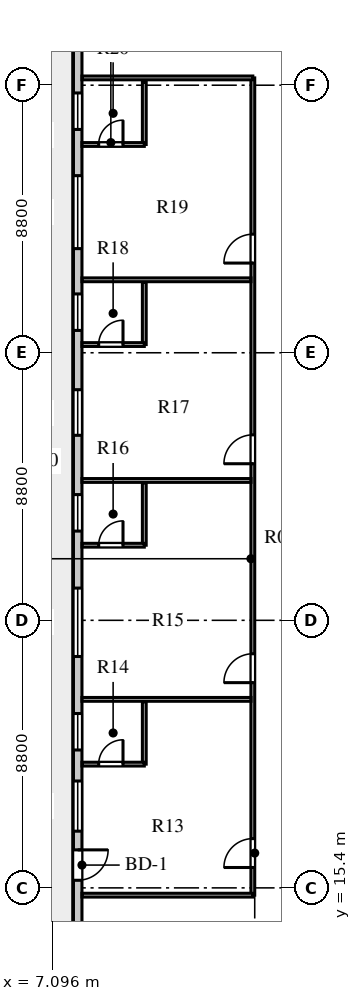
"""IFC4 building model, lengths in metres.
Left out: names, types, materials, properties, quantities, classifications, styles, units other than length and angle.
Written with IfcOpenShell. Run it as: python <this file> out.ifc"""

import sys

from ifc_helpers import new_model, si_unit, direction, frame, frame_2d, origin, place, context, subcontext, project, spatial, rectangle, extrude, element, fill, save


model = new_model("IFC4")
c1 = context("Model", 3, precision=1e-05, world=origin(), true_north=direction((0.0, 1.0)))
c2 = subcontext(c1, "Body", "Model", "MODEL_VIEW")
j1 = project(units=[si_unit("LENGTHUNIT", "METRE"), si_unit("PLANEANGLEUNIT", "RADIAN")], contexts=[c1])
p1 = place(None, origin())
s1 = spatial("IfcSite", under=j1, at=p1, CompositionType="ELEMENT")
p2 = place(p1, origin())
s2 = spatial("IfcBuilding", under=s1, at=p2, CompositionType="ELEMENT")
p3 = place(p2, frame((0.0, 0.0, 165.6)))
s3 = spatial("IfcBuildingStorey", under=s2, at=p3, CompositionType="ELEMENT", Elevation=165.6)
p4 = place(p3, frame((7.94, 44.07, 0.0), z_axis=(0.0, 0.0, 1.0), x_axis=(0.0, -1.0, 0.0)))
e1 = element("IfcWall", 1, at=p4, inside=s3, PredefinedType="STANDARD", context=c2, shape_type="SweptSolid", body=[
    extrude(rectangle(XDim=30.94, YDim=0.28, at=frame_2d((15.47, 0.0))), origin(), (0.0, 0.0, 1.0), 3.6),
])
p5 = place(p4, frame((27.42, 0.0, 0.0)))
e2 = element("IfcOpeningElement", 2, at=p5, cuts=e1, PredefinedType="OPENING", context=c2, shape_type="SweptSolid", body=[
    extrude(rectangle(XDim=1.0, YDim=2.05, at=frame_2d((0.5, 1.025))), frame((0.0, 0.15, 0.0), z_axis=(0.0, -1.0, 0.0), x_axis=(1.0, 0.0, 0.0)), (0.0, 0.0, 1.0), 0.3),
])
p6 = place(p4, frame((25.155, 0.0, 0.8)))
e3 = element("IfcOpeningElement", 3, at=p6, cuts=e1, PredefinedType="OPENING", context=c2, shape_type="SweptSolid", body=[
    extrude(rectangle(XDim=1.65, YDim=1.95, at=frame_2d((0.825, 0.975))), frame((0.0, 0.15, 0.0), z_axis=(0.0, -1.0, 0.0), x_axis=(1.0, 0.0, 0.0)), (0.0, 0.0, 1.0), 0.3),
])
p7 = place(p4, frame((22.935, 0.0, 0.8)))
e4 = element("IfcOpeningElement", 4, at=p7, cuts=e1, PredefinedType="OPENING", context=c2, shape_type="SweptSolid", body=[
    extrude(rectangle(XDim=1.2, YDim=1.75, at=frame_2d((0.6, 0.875))), frame((0.0, 0.15, 0.0), z_axis=(0.0, -1.0, 0.0), x_axis=(1.0, 0.0, 0.0)), (0.0, 0.0, 1.0), 0.3),
])
p8 = place(p4, frame((18.81, 0.0, 0.8)))
e5 = element("IfcOpeningElement", 5, at=p8, cuts=e1, PredefinedType="OPENING", context=c2, shape_type="SweptSolid", body=[
    extrude(rectangle(XDim=2.25, YDim=2.0, at=frame_2d((1.125, 1.0))), frame((0.0, 0.15, 0.0), z_axis=(0.0, -1.0, 0.0), x_axis=(1.0, 0.0, 0.0)), (0.0, 0.0, 1.0), 0.3),
])
p9 = place(p4, frame((15.735, 0.0, 0.8)))
e6 = element("IfcOpeningElement", 6, at=p9, cuts=e1, PredefinedType="OPENING", context=c2, shape_type="SweptSolid", body=[
    extrude(rectangle(XDim=1.2, YDim=1.75, at=frame_2d((0.6, 0.875))), frame((0.0, 0.15, 0.0), z_axis=(0.0, -1.0, 0.0), x_axis=(1.0, 0.0, 0.0)), (0.0, 0.0, 1.0), 0.3),
])
p10 = place(p4, frame((12.285, 0.0, 0.8)))
e7 = element("IfcOpeningElement", 7, at=p10, cuts=e1, PredefinedType="OPENING", context=c2, shape_type="SweptSolid", body=[
    extrude(rectangle(XDim=1.5, YDim=2.0, at=frame_2d((0.75, 1.0))), frame((0.0, 0.15, 0.0), z_axis=(0.0, -1.0, 0.0), x_axis=(1.0, 0.0, 0.0)), (0.0, 0.0, 1.0), 0.3),
])
p11 = place(p4, frame((9.135, 0.0, 0.8)))
e8 = element("IfcOpeningElement", 8, at=p11, cuts=e1, PredefinedType="OPENING", context=c2, shape_type="SweptSolid", body=[
    extrude(rectangle(XDim=1.2, YDim=1.75, at=frame_2d((0.6, 0.875))), frame((0.0, 0.15, 0.0), z_axis=(0.0, -1.0, 0.0), x_axis=(1.0, 0.0, 0.0)), (0.0, 0.0, 1.0), 0.3),
])
p12 = place(p4, frame((5.245, 0.0, 0.8)))
e9 = element("IfcOpeningElement", 9, at=p12, cuts=e1, PredefinedType="OPENING", context=c2, shape_type="SweptSolid", body=[
    extrude(rectangle(XDim=2.4, YDim=2.05, at=frame_2d((1.2, 1.025))), frame((0.0, 0.15, 0.0), z_axis=(0.0, -1.0, 0.0), x_axis=(1.0, 0.0, 0.0)), (0.0, 0.0, 1.0), 0.3),
])
p13 = place(p4, frame((2.525, 0.0, 0.8)))
e10 = element("IfcOpeningElement", 10, at=p13, cuts=e1, PredefinedType="OPENING", context=c2, shape_type="SweptSolid", body=[
    extrude(rectangle(XDim=1.2, YDim=1.75, at=frame_2d((0.6, 0.875))), frame((0.0, 0.15, 0.0), z_axis=(0.0, -1.0, 0.0), x_axis=(1.0, 0.0, 0.0)), (0.0, 0.0, 1.0), 0.3),
])
p14 = place(p3, frame((13.7, 15.16, 0.0), z_axis=(0.0, 0.0, 1.0), x_axis=(0.0, 1.0, 0.0)))
e11 = element("IfcWall", 11, at=p14, inside=s3, PredefinedType="PLUMBINGWALL", context=c2, shape_type="SweptSolid", body=[
    extrude(rectangle(XDim=26.88, YDim=0.125, at=frame_2d((13.44, 0.0))), origin(), (0.0, 0.0, 1.0), 3.6),
])
p15 = place(p14, frame((0.91, 0.0, 0.0)))
e12 = element("IfcOpeningElement", 12, at=p15, cuts=e11, PredefinedType="OPENING", context=c2, shape_type="SweptSolid", body=[
    extrude(rectangle(XDim=0.95, YDim=2.1, at=frame_2d((0.475, 1.05))), frame((0.0, 0.073, 0.0), z_axis=(0.0, -1.0, 0.0), x_axis=(1.0, 0.0, 0.0)), (0.0, 0.0, 1.0), 0.145),
])
p16 = place(p14, frame((6.99, 0.0, 0.0)))
e13 = element("IfcOpeningElement", 13, at=p16, cuts=e11, PredefinedType="OPENING", context=c2, shape_type="SweptSolid", body=[
    extrude(rectangle(XDim=0.95, YDim=2.1, at=frame_2d((0.475, 1.05))), frame((0.0, 0.073, 0.0), z_axis=(0.0, -1.0, 0.0), x_axis=(1.0, 0.0, 0.0)), (0.0, 0.0, 1.0), 0.145),
])
p17 = place(p14, frame((14.19, 0.0, 0.0)))
e14 = element("IfcOpeningElement", 14, at=p17, cuts=e11, PredefinedType="OPENING", context=c2, shape_type="SweptSolid", body=[
    extrude(rectangle(XDim=0.95, YDim=2.1, at=frame_2d((0.475, 1.05))), frame((0.0, 0.073, 0.0), z_axis=(0.0, -1.0, 0.0), x_axis=(1.0, 0.0, 0.0)), (0.0, 0.0, 1.0), 0.145),
])
p18 = place(p14, frame((20.79, 0.0, 0.0)))
e15 = element("IfcOpeningElement", 15, at=p18, cuts=e11, PredefinedType="OPENING", context=c2, shape_type="SweptSolid", body=[
    extrude(rectangle(XDim=0.95, YDim=2.1, at=frame_2d((0.475, 1.05))), frame((0.0, 0.073, 0.0), z_axis=(0.0, -1.0, 0.0), x_axis=(1.0, 0.0, 0.0)), (0.0, 0.0, 1.0), 0.145),
])
for number, where, z_axis, x_axis in (
    (16, (8.08, 15.16, 0.0), (0.0, 0.0, 1.0), (1.0, 0.0, 0.0)),
    (17, (8.08, 42.04, 0.0), (0.0, 0.0, 1.0), (1.0, 0.0, 0.0)),
):
    element("IfcWall", number, at=place(p3, frame(where, z_axis=z_axis, x_axis=x_axis)), inside=s3, PredefinedType="PLUMBINGWALL", context=c2, shape_type="SweptSolid", body=[
        extrude(rectangle(XDim=5.62, YDim=0.125, at=frame_2d((2.81, 0.0))), origin(), (0.0, 0.0, 1.0), 3.15),
    ])
p19 = place(p3, frame((10.13, 19.47, 0.0), z_axis=(0.0, 0.0, 1.0), x_axis=(0.0, 1.0, 0.0)))
e18 = element("IfcWall", 18, at=p19, inside=s3, PredefinedType="PLUMBINGWALL", context=c2, shape_type="SweptSolid", body=[
    extrude(rectangle(XDim=2.05, YDim=0.125, at=frame_2d((1.025, 0.0))), origin(), (0.0, 0.0, 1.0), 3.6),
])
p20 = place(p3, frame((8.08, 19.47, 0.0), z_axis=(0.0, 0.0, 1.0), x_axis=(1.0, 0.0, 0.0)))
e19 = element("IfcWall", 19, at=p20, inside=s3, PredefinedType="PLUMBINGWALL", context=c2, shape_type="SweptSolid", body=[
    extrude(rectangle(XDim=2.05, YDim=0.125, at=frame_2d((1.025, 0.0))), origin(), (0.0, 0.0, 1.0), 3.6),
])
p21 = place(p20, frame((0.55, 0.0, 0.0)))
e20 = element("IfcOpeningElement", 20, at=p21, cuts=e19, PredefinedType="OPENING", context=c2, shape_type="SweptSolid", body=[
    extrude(rectangle(XDim=0.8, YDim=2.05, at=frame_2d((0.4, 1.025))), frame((0.0, 0.073, 0.0), z_axis=(0.0, -1.0, 0.0), x_axis=(1.0, 0.0, 0.0)), (0.0, 0.0, 1.0), 0.145),
])
p22 = place(p3, frame((8.08, 21.6, 0.0), z_axis=(0.0, 0.0, 1.0), x_axis=(1.0, 0.0, 0.0)))
e21 = element("IfcWall", 21, at=p22, inside=s3, PredefinedType="PLUMBINGWALL", context=c2, shape_type="SweptSolid", body=[
    extrude(rectangle(XDim=5.56, YDim=0.125, at=frame_2d((2.78, 0.0))), origin(), (0.0, 0.0, 1.0), 3.6),
])
p23 = place(p3, frame((10.13, 26.67, 0.0), z_axis=(0.0, 0.0, 1.0), x_axis=(0.0, 1.0, 0.0)))
e22 = element("IfcWall", 22, at=p23, inside=s3, PredefinedType="PLUMBINGWALL", context=c2, shape_type="SweptSolid", body=[
    extrude(rectangle(XDim=2.05, YDim=0.125, at=frame_2d((1.025, 0.0))), origin(), (0.0, 0.0, 1.0), 3.6),
])
p24 = place(p3, frame((8.08, 26.67, 0.0), z_axis=(0.0, 0.0, 1.0), x_axis=(1.0, 0.0, 0.0)))
e23 = element("IfcWall", 23, at=p24, inside=s3, PredefinedType="PLUMBINGWALL", context=c2, shape_type="SweptSolid", body=[
    extrude(rectangle(XDim=2.05, YDim=0.125, at=frame_2d((1.025, 0.0))), origin(), (0.0, 0.0, 1.0), 3.6),
])
p25 = place(p24, frame((0.55, 0.0, 0.0)))
e24 = element("IfcOpeningElement", 24, at=p25, cuts=e23, PredefinedType="OPENING", context=c2, shape_type="SweptSolid", body=[
    extrude(rectangle(XDim=0.8, YDim=2.05, at=frame_2d((0.4, 1.025))), frame((0.0, 0.073, 0.0), z_axis=(0.0, -1.0, 0.0), x_axis=(1.0, 0.0, 0.0)), (0.0, 0.0, 1.0), 0.145),
])
p26 = place(p3, frame((8.08, 28.8, 0.0), z_axis=(0.0, 0.0, 1.0), x_axis=(1.0, 0.0, 0.0)))
e25 = element("IfcWall", 25, at=p26, inside=s3, PredefinedType="PLUMBINGWALL", context=c2, shape_type="SweptSolid", body=[
    extrude(rectangle(XDim=5.56, YDim=0.125, at=frame_2d((2.78, 0.0))), origin(), (0.0, 0.0, 1.0), 3.6),
])
p27 = place(p3, frame((10.13, 33.27, 0.0), z_axis=(0.0, 0.0, 1.0), x_axis=(0.0, 1.0, 0.0)))
e26 = element("IfcWall", 26, at=p27, inside=s3, PredefinedType="PLUMBINGWALL", context=c2, shape_type="SweptSolid", body=[
    extrude(rectangle(XDim=2.05, YDim=0.125, at=frame_2d((1.025, 0.0))), origin(), (0.0, 0.0, 1.0), 3.6),
])
p28 = place(p3, frame((8.08, 33.27, 0.0), z_axis=(0.0, 0.0, 1.0), x_axis=(1.0, 0.0, 0.0)))
e27 = element("IfcWall", 27, at=p28, inside=s3, PredefinedType="PLUMBINGWALL", context=c2, shape_type="SweptSolid", body=[
    extrude(rectangle(XDim=2.05, YDim=0.125, at=frame_2d((1.025, 0.0))), origin(), (0.0, 0.0, 1.0), 3.15),
])
p29 = place(p28, frame((0.55, 0.0, 0.0)))
e28 = element("IfcOpeningElement", 28, at=p29, cuts=e27, PredefinedType="OPENING", context=c2, shape_type="SweptSolid", body=[
    extrude(rectangle(XDim=0.8, YDim=2.05, at=frame_2d((0.4, 1.025))), frame((0.0, 0.073, 0.0), z_axis=(0.0, -1.0, 0.0), x_axis=(1.0, 0.0, 0.0)), (0.0, 0.0, 1.0), 0.145),
])
p30 = place(p3, frame((8.08, 35.4, 0.0), z_axis=(0.0, 0.0, 1.0), x_axis=(1.0, 0.0, 0.0)))
e29 = element("IfcWall", 29, at=p30, inside=s3, PredefinedType="PLUMBINGWALL", context=c2, shape_type="SweptSolid", body=[
    extrude(rectangle(XDim=5.56, YDim=0.125, at=frame_2d((2.78, 0.0))), origin(), (0.0, 0.0, 1.0), 3.6),
])
p31 = place(p3, frame((10.13, 39.85, 0.0), z_axis=(0.0, 0.0, 1.0), x_axis=(0.0, 1.0, 0.0)))
e30 = element("IfcWall", 30, at=p31, inside=s3, PredefinedType="PLUMBINGWALL", context=c2, shape_type="SweptSolid", body=[
    extrude(rectangle(XDim=2.05, YDim=0.125, at=frame_2d((1.025, 0.0))), origin(), (0.0, 0.0, 1.0), 3.6),
])
p32 = place(p3, frame((8.08, 39.85, 0.0), z_axis=(0.0, 0.0, 1.0), x_axis=(1.0, 0.0, 0.0)))
e31 = element("IfcWall", 31, at=p32, inside=s3, PredefinedType="PLUMBINGWALL", context=c2, shape_type="SweptSolid", body=[
    extrude(rectangle(XDim=2.05, YDim=0.125, at=frame_2d((1.025, 0.0))), origin(), (0.0, 0.0, 1.0), 3.6),
])
p33 = place(p32, frame((0.55, 0.0, 0.0)))
e32 = element("IfcOpeningElement", 32, at=p33, cuts=e31, PredefinedType="OPENING", context=c2, shape_type="SweptSolid", body=[
    extrude(rectangle(XDim=0.8, YDim=2.05, at=frame_2d((0.4, 1.025))), frame((0.0, 0.073, 0.0), z_axis=(0.0, -1.0, 0.0), x_axis=(1.0, 0.0, 0.0)), (0.0, 0.0, 1.0), 0.145),
])
p34 = place(p5, frame((1.0, 0.0, 0.0), z_axis=(0.0, 0.0, 1.0), x_axis=(-1.0, 0.0, 0.0)))
e33 = element("IfcDoor", 33, at=p34, inside=s3, OperationType="SINGLE_SWING_RIGHT", PredefinedType="DOOR", context=c2, shape_type="SweptSolid", body=[
    extrude(rectangle(XDim=1.0, YDim=2.05, at=frame_2d((0.5, 1.025))), frame((0.0, 0.025, 0.0), z_axis=(0.0, -1.0, 0.0), x_axis=(1.0, 0.0, 0.0)), (0.0, 0.0, 1.0), 0.05),
])
fill(e2, e33)
p35 = place(p6, origin())
e34 = element("IfcWindow", 34, at=p35, inside=s3, PartitioningType="SINGLE_PANEL", PredefinedType="WINDOW", context=c2, shape_type="SweptSolid", body=[
    extrude(rectangle(XDim=1.65, YDim=1.95, at=frame_2d((0.825, 0.975))), frame((0.0, 0.03, 0.0), z_axis=(0.0, -1.0, 0.0), x_axis=(1.0, 0.0, 0.0)), (0.0, 0.0, 1.0), 0.06),
])
fill(e3, e34)
p36 = place(p7, origin())
e35 = element("IfcWindow", 35, at=p36, inside=s3, PartitioningType="SINGLE_PANEL", PredefinedType="WINDOW", context=c2, shape_type="SweptSolid", body=[
    extrude(rectangle(XDim=1.2, YDim=1.75, at=frame_2d((0.6, 0.875))), frame((0.0, 0.03, 0.0), z_axis=(0.0, -1.0, 0.0), x_axis=(1.0, 0.0, 0.0)), (0.0, 0.0, 1.0), 0.06),
])
fill(e4, e35)
p37 = place(p8, origin())
e36 = element("IfcWindow", 36, at=p37, inside=s3, PartitioningType="SINGLE_PANEL", PredefinedType="WINDOW", context=c2, shape_type="SweptSolid", body=[
    extrude(rectangle(XDim=2.25, YDim=2.0, at=frame_2d((1.125, 1.0))), frame((0.0, 0.03, 0.0), z_axis=(0.0, -1.0, 0.0), x_axis=(1.0, 0.0, 0.0)), (0.0, 0.0, 1.0), 0.06),
])
fill(e5, e36)
p38 = place(p9, origin())
e37 = element("IfcWindow", 37, at=p38, inside=s3, PartitioningType="SINGLE_PANEL", PredefinedType="WINDOW", context=c2, shape_type="SweptSolid", body=[
    extrude(rectangle(XDim=1.2, YDim=1.75, at=frame_2d((0.6, 0.875))), frame((0.0, 0.03, 0.0), z_axis=(0.0, -1.0, 0.0), x_axis=(1.0, 0.0, 0.0)), (0.0, 0.0, 1.0), 0.06),
])
fill(e6, e37)
p39 = place(p10, origin())
e38 = element("IfcWindow", 38, at=p39, inside=s3, PartitioningType="SINGLE_PANEL", PredefinedType="WINDOW", context=c2, shape_type="SweptSolid", body=[
    extrude(rectangle(XDim=1.5, YDim=2.0, at=frame_2d((0.75, 1.0))), frame((0.0, 0.03, 0.0), z_axis=(0.0, -1.0, 0.0), x_axis=(1.0, 0.0, 0.0)), (0.0, 0.0, 1.0), 0.06),
])
fill(e7, e38)
p40 = place(p11, origin())
e39 = element("IfcWindow", 39, at=p40, inside=s3, PartitioningType="SINGLE_PANEL", PredefinedType="WINDOW", context=c2, shape_type="SweptSolid", body=[
    extrude(rectangle(XDim=1.2, YDim=1.75, at=frame_2d((0.6, 0.875))), frame((0.0, 0.03, 0.0), z_axis=(0.0, -1.0, 0.0), x_axis=(1.0, 0.0, 0.0)), (0.0, 0.0, 1.0), 0.06),
])
fill(e8, e39)
p41 = place(p12, origin())
e40 = element("IfcWindow", 40, at=p41, inside=s3, PartitioningType="SINGLE_PANEL", PredefinedType="WINDOW", context=c2, shape_type="SweptSolid", body=[
    extrude(rectangle(XDim=2.4, YDim=2.05, at=frame_2d((1.2, 1.025))), frame((0.0, 0.03, 0.0), z_axis=(0.0, -1.0, 0.0), x_axis=(1.0, 0.0, 0.0)), (0.0, 0.0, 1.0), 0.06),
])
fill(e9, e40)
p42 = place(p13, origin())
e41 = element("IfcWindow", 41, at=p42, inside=s3, PartitioningType="SINGLE_PANEL", PredefinedType="WINDOW", context=c2, shape_type="SweptSolid", body=[
    extrude(rectangle(XDim=1.2, YDim=1.75, at=frame_2d((0.6, 0.875))), frame((0.0, 0.03, 0.0), z_axis=(0.0, -1.0, 0.0), x_axis=(1.0, 0.0, 0.0)), (0.0, 0.0, 1.0), 0.06),
])
fill(e10, e41)
p43 = place(p15, origin())
e42 = element("IfcDoor", 42, at=p43, inside=s3, OperationType="SINGLE_SWING_LEFT", PredefinedType="DOOR", context=c2, shape_type="SweptSolid", body=[
    extrude(rectangle(XDim=0.95, YDim=2.1, at=frame_2d((0.475, 1.05))), frame((0.0, 0.025, 0.0), z_axis=(0.0, -1.0, 0.0), x_axis=(1.0, 0.0, 0.0)), (0.0, 0.0, 1.0), 0.05),
])
fill(e12, e42)
p44 = place(p21, frame((0.8, 0.0, 0.0), z_axis=(0.0, 0.0, 1.0), x_axis=(-1.0, 0.0, 0.0)))
e43 = element("IfcDoor", 43, at=p44, inside=s3, OperationType="SINGLE_SWING_LEFT", PredefinedType="DOOR", context=c2, shape_type="SweptSolid", body=[
    extrude(rectangle(XDim=0.8, YDim=2.05, at=frame_2d((0.4, 1.025))), frame((0.0, 0.025, 0.0), z_axis=(0.0, -1.0, 0.0), x_axis=(1.0, 0.0, 0.0)), (0.0, 0.0, 1.0), 0.05),
])
fill(e20, e43)
p45 = place(p16, origin())
e44 = element("IfcDoor", 44, at=p45, inside=s3, OperationType="SINGLE_SWING_LEFT", PredefinedType="DOOR", context=c2, shape_type="SweptSolid", body=[
    extrude(rectangle(XDim=0.95, YDim=2.1, at=frame_2d((0.475, 1.05))), frame((0.0, 0.025, 0.0), z_axis=(0.0, -1.0, 0.0), x_axis=(1.0, 0.0, 0.0)), (0.0, 0.0, 1.0), 0.05),
])
fill(e13, e44)
p46 = place(p25, frame((0.8, 0.0, 0.0), z_axis=(0.0, 0.0, 1.0), x_axis=(-1.0, 0.0, 0.0)))
e45 = element("IfcDoor", 45, at=p46, inside=s3, OperationType="SINGLE_SWING_LEFT", PredefinedType="DOOR", context=c2, shape_type="SweptSolid", body=[
    extrude(rectangle(XDim=0.8, YDim=2.05, at=frame_2d((0.4, 1.025))), frame((0.0, 0.025, 0.0), z_axis=(0.0, -1.0, 0.0), x_axis=(1.0, 0.0, 0.0)), (0.0, 0.0, 1.0), 0.05),
])
fill(e24, e45)
p47 = place(p17, origin())
e46 = element("IfcDoor", 46, at=p47, inside=s3, OperationType="SINGLE_SWING_LEFT", PredefinedType="DOOR", context=c2, shape_type="SweptSolid", body=[
    extrude(rectangle(XDim=0.95, YDim=2.1, at=frame_2d((0.475, 1.05))), frame((0.0, 0.025, 0.0), z_axis=(0.0, -1.0, 0.0), x_axis=(1.0, 0.0, 0.0)), (0.0, 0.0, 1.0), 0.05),
])
fill(e14, e46)
p48 = place(p29, frame((0.8, 0.0, 0.0), z_axis=(0.0, 0.0, 1.0), x_axis=(-1.0, 0.0, 0.0)))
e47 = element("IfcDoor", 47, at=p48, inside=s3, OperationType="SINGLE_SWING_LEFT", PredefinedType="DOOR", context=c2, shape_type="SweptSolid", body=[
    extrude(rectangle(XDim=0.8, YDim=2.05, at=frame_2d((0.4, 1.025))), frame((0.0, 0.025, 0.0), z_axis=(0.0, -1.0, 0.0), x_axis=(1.0, 0.0, 0.0)), (0.0, 0.0, 1.0), 0.05),
])
fill(e28, e47)
p49 = place(p18, origin())
e48 = element("IfcDoor", 48, at=p49, inside=s3, OperationType="SINGLE_SWING_LEFT", PredefinedType="DOOR", context=c2, shape_type="SweptSolid", body=[
    extrude(rectangle(XDim=0.95, YDim=2.1, at=frame_2d((0.475, 1.05))), frame((0.0, 0.025, 0.0), z_axis=(0.0, -1.0, 0.0), x_axis=(1.0, 0.0, 0.0)), (0.0, 0.0, 1.0), 0.05),
])
fill(e15, e48)
p50 = place(p33, frame((0.8, 0.0, 0.0), z_axis=(0.0, 0.0, 1.0), x_axis=(-1.0, 0.0, 0.0)))
e49 = element("IfcDoor", 49, at=p50, inside=s3, OperationType="SINGLE_SWING_LEFT", PredefinedType="DOOR", context=c2, shape_type="SweptSolid", body=[
    extrude(rectangle(XDim=0.8, YDim=2.05, at=frame_2d((0.4, 1.025))), frame((0.0, 0.025, 0.0), z_axis=(0.0, -1.0, 0.0), x_axis=(1.0, 0.0, 0.0)), (0.0, 0.0, 1.0), 0.05),
])
fill(e32, e49)
save(model, sys.argv[1])
